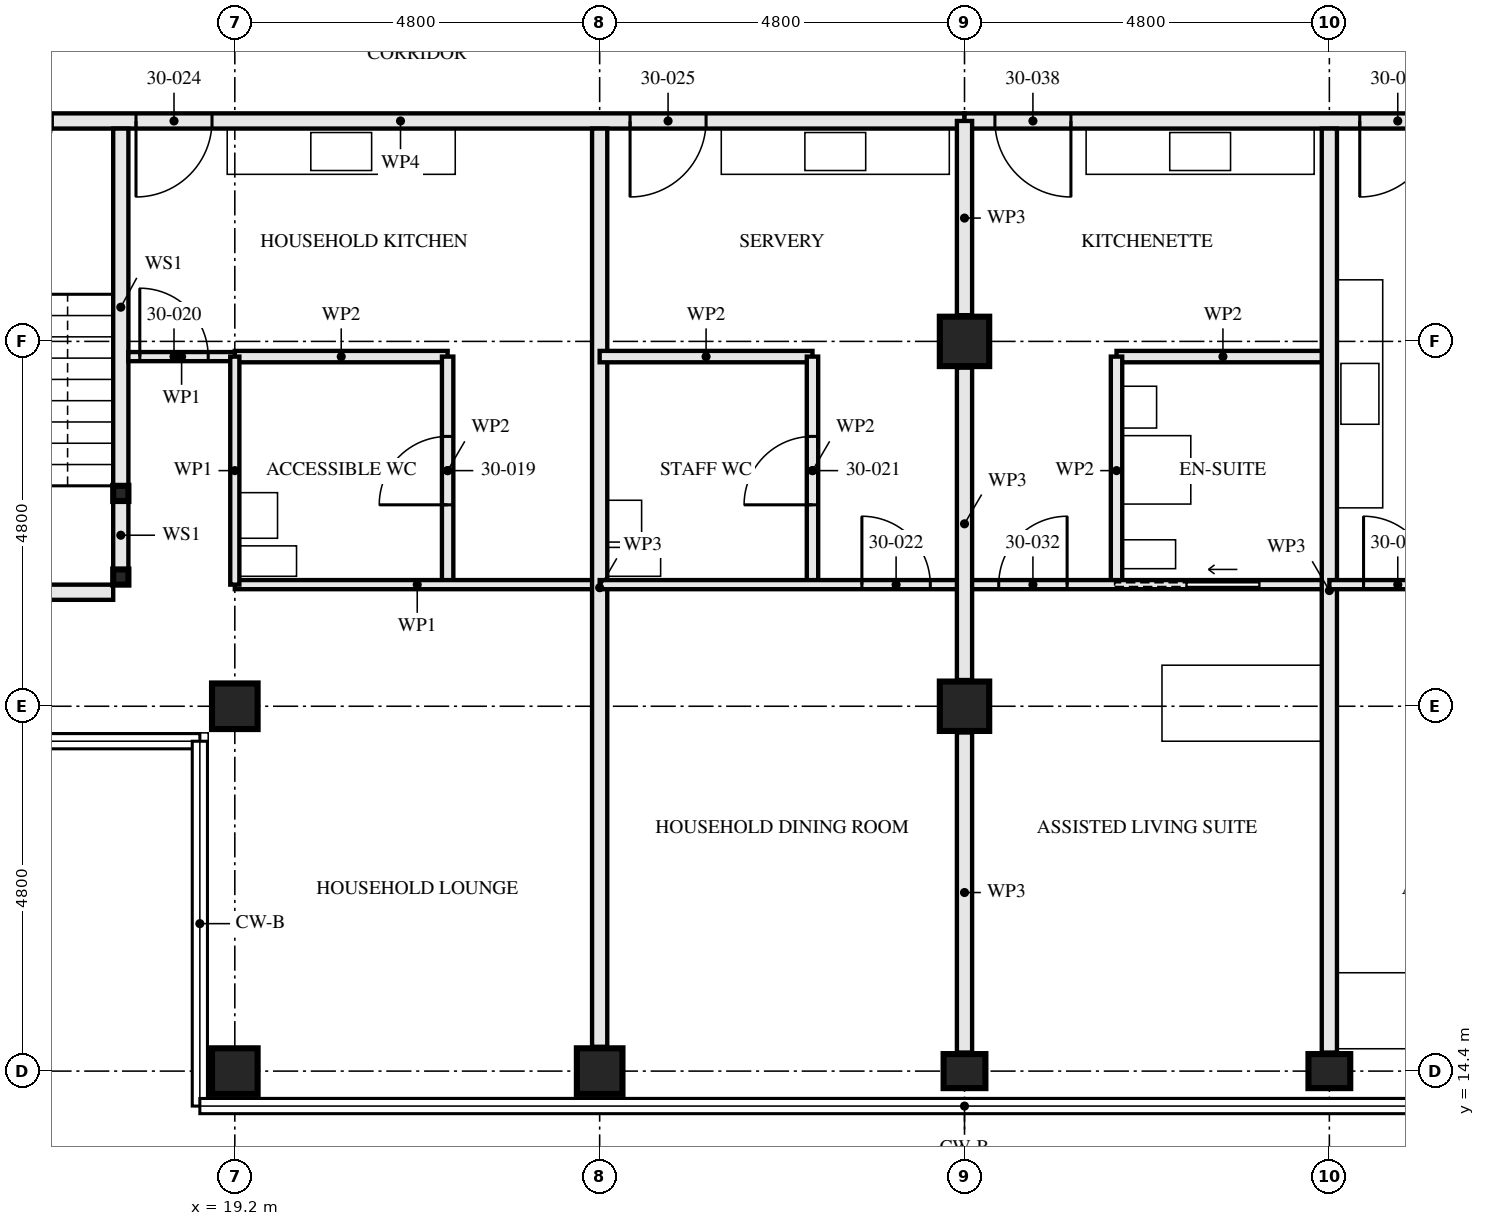
"""IFC4 building model, lengths in metres.
Left out: names, types, materials, properties, quantities, classifications, styles, units other than length and angle.
Written with IfcOpenShell. Run it as: python <this file> out.ifc"""

import sys

from ifc_helpers import new_model, si_unit, direction, frame, frame_2d, origin, origin_2d, place, context, subcontext, project, spatial, rectangle, hollow_rectangle, i_section, extrude, element, fill, save


model = new_model("IFC4")
c1 = context("Model", 3, precision=1e-05, world=origin(), true_north=direction((0.0, 1.0)))
c2 = subcontext(c1, "Body", "Model", "MODEL_VIEW")
j1 = project(units=[si_unit("LENGTHUNIT", "METRE"), si_unit("PLANEANGLEUNIT", "RADIAN")], contexts=[c1])
p1 = place(None, origin())
s1 = spatial("IfcSite", under=j1, at=p1, CompositionType="ELEMENT")
p2 = place(p1, origin())
s2 = spatial("IfcBuilding", under=s1, at=p2, CompositionType="ELEMENT")
p3 = place(p2, frame((0.0, 0.0, 112.0)))
s3 = spatial("IfcBuildingStorey", under=s2, at=p3, CompositionType="ELEMENT", Elevation=112.0)
for number, where, z_axis, x_axis in (
    (1, (19.2, 14.4, 0.0), (0.0, 0.0, 1.0), (0.0, 1.0, 0.0)),
    (2, (19.2, 19.2, 0.0), (0.0, 0.0, 1.0), (0.0, 1.0, 0.0)),
    (3, (24.0, 14.4, 0.0), (0.0, 0.0, 1.0), (0.0, 1.0, 0.0)),
):
    element("IfcColumn", number, at=place(p3, frame(where, z_axis=z_axis, x_axis=x_axis)), inside=s3, PredefinedType="COLUMN", context=c2, shape_type="SweptSolid", body=[
        extrude(hollow_rectangle(XDim=0.6, YDim=0.6, WallThickness=0.08, at=origin_2d()), origin(), (0.0, 0.0, 1.0), 3.5),
    ])
p4 = place(p3, frame((28.8, 14.4, 0.0), z_axis=(0.0, 0.0, 1.0), x_axis=(0.0, 1.0, 0.0)))
e4 = element("IfcColumn", 4, at=p4, inside=s3, PredefinedType="COLUMN", context=c2, shape_type="SweptSolid", body=[
    extrude(i_section(OverallWidth=0.448, OverallDepth=0.55, WebThickness=0.072, FlangeThickness=0.115, FilletRadius=0.015, at=origin_2d()), origin(), (0.0, 0.0, 1.0), 3.5),
])
for number, where, z_axis, x_axis in (
    (5, (28.8, 19.2, 0.0), (0.0, 0.0, 1.0), (1.0, 0.0, 0.0)),
    (6, (28.8, 24.0, 0.0), (0.0, 0.0, 1.0), (1.0, 0.0, 0.0)),
):
    element("IfcColumn", number, at=place(p3, frame(where, z_axis=z_axis, x_axis=x_axis)), inside=s3, PredefinedType="COLUMN", context=c2, shape_type="SweptSolid", body=[
        extrude(hollow_rectangle(XDim=0.65, YDim=0.65, WallThickness=0.05, at=origin_2d()), origin(), (0.0, 0.0, 1.0), 3.5),
    ])
p5 = place(p3, frame((33.6, 14.4, 0.0), z_axis=(0.0, 0.0, 1.0), x_axis=(0.0, 1.0, 0.0)))
e7 = element("IfcColumn", 7, at=p5, inside=s3, PredefinedType="COLUMN", context=c2, shape_type="SweptSolid", body=[
    extrude(i_section(OverallWidth=0.448, OverallDepth=0.55, WebThickness=0.072, FlangeThickness=0.115, FilletRadius=0.015, at=origin_2d()), origin(), (0.0, 0.0, 1.0), 3.5),
])
for number, where, z_axis, x_axis in (
    (8, (17.7, 20.9, 0.0), (0.0, 0.0, 1.0), (1.0, 0.0, 0.0)),
    (9, (17.7, 22.0, 0.0), (0.0, 0.0, 1.0), (1.0, 0.0, 0.0)),
):
    element("IfcColumn", number, at=place(p3, frame(where, z_axis=z_axis, x_axis=x_axis)), inside=s3, PredefinedType="COLUMN", context=c2, shape_type="SweptSolid", body=[
        extrude(hollow_rectangle(XDim=0.2, YDim=0.2, WallThickness=0.008, at=origin_2d()), origin(), (0.0, 0.0, 1.0), 3.33),
    ])
p6 = place(p3, frame((17.7, 21.0, 0.0), z_axis=(0.0, 0.0, 1.0), x_axis=(0.0, 1.0, 0.0)))
e10 = element("IfcWall", 10, at=p6, inside=s3, PredefinedType="SOLIDWALL", context=c2, shape_type="SweptSolid", body=[
    extrude(rectangle(XDim=0.9, YDim=0.2, at=frame_2d((0.45, 0.0))), origin(), (0.0, 0.0, 1.0), 2.99),
])
p7 = place(p3, frame((17.7, 22.1, 0.0), z_axis=(0.0, 0.0, 1.0), x_axis=(0.0, 1.0, 0.0)))
e11 = element("IfcWall", 11, at=p7, inside=s3, PredefinedType="SOLIDWALL", context=c2, shape_type="SweptSolid", body=[
    extrude(rectangle(XDim=4.7, YDim=0.2, at=frame_2d((2.35, 0.0))), origin(), (0.0, 0.0, 1.0), 2.99),
])
p8 = place(p3, frame((15.0, 20.7, 0.0), z_axis=(0.0, 0.0, 1.0), x_axis=(1.0, 0.0, 0.0)))
e12 = element("IfcWall", 12, at=p8, inside=s3, PredefinedType="SOLIDWALL", context=c2, shape_type="SweptSolid", body=[
    extrude(rectangle(XDim=2.6, YDim=0.2, at=frame_2d((1.3, 0.0))), origin(), (0.0, 0.0, 1.0), 3.33),
])
p9 = place(p3, frame((22.0, 20.8, 0.0), z_axis=(0.0, 0.0, 1.0), x_axis=(0.0, 1.0, 0.0)))
e13 = element("IfcWall", 13, at=p9, inside=s3, PredefinedType="PARTITIONING", context=c2, shape_type="SweptSolid", body=[
    extrude(rectangle(XDim=3.0, YDim=0.15, at=frame_2d((1.5, 0.0))), origin(), (0.0, 0.0, 1.0), 3.33),
])
p10 = place(p9, frame((1.05, 0.0, 0.0)))
e14 = element("IfcOpeningElement", 14, at=p10, cuts=e13, PredefinedType="OPENING", context=c2, shape_type="SweptSolid", body=[
    extrude(rectangle(XDim=0.9, YDim=2.1, at=frame_2d((0.45, 1.05))), frame((0.0, 0.085, 0.0), z_axis=(0.0, -1.0, 0.0), x_axis=(1.0, 0.0, 0.0)), (0.0, 0.0, 1.0), 0.171),
])
p11 = place(p3, frame((19.2, 23.8, 0.0), z_axis=(0.0, 0.0, 1.0), x_axis=(1.0, 0.0, 0.0)))
e15 = element("IfcWall", 15, at=p11, inside=s3, PredefinedType="PARTITIONING", context=c2, shape_type="SweptSolid", body=[
    extrude(rectangle(XDim=2.8, YDim=0.15, at=frame_2d((1.4, 0.0))), origin(), (0.0, 0.0, 1.0), 3.33),
])
p12 = place(p3, frame((17.8, 23.8, 0.0), z_axis=(0.0, 0.0, 1.0), x_axis=(1.0, 0.0, 0.0)))
e16 = element("IfcWall", 16, at=p12, inside=s3, PredefinedType="PARTITIONING", context=c2, shape_type="SweptSolid", body=[
    extrude(rectangle(XDim=1.4, YDim=0.12, at=frame_2d((0.7, 0.0))), origin(), (0.0, 0.0, 1.0), 3.33),
])
p13 = place(p12, frame((0.15, 0.0, 0.0)))
e17 = element("IfcOpeningElement", 17, at=p13, cuts=e16, PredefinedType="OPENING", context=c2, shape_type="SweptSolid", body=[
    extrude(rectangle(XDim=0.9, YDim=2.1, at=frame_2d((0.45, 1.05))), frame((0.0, 0.071, 0.0), z_axis=(0.0, -1.0, 0.0), x_axis=(1.0, 0.0, 0.0)), (0.0, 0.0, 1.0), 0.141),
])
p14 = place(p3, frame((19.2, 20.8, 0.0), z_axis=(0.0, 0.0, 1.0), x_axis=(1.0, 0.0, 0.0)))
e18 = element("IfcWall", 18, at=p14, inside=s3, PredefinedType="PARTITIONING", context=c2, shape_type="SweptSolid", body=[
    extrude(rectangle(XDim=4.8, YDim=0.12, at=frame_2d((2.4, 0.0))), origin(), (0.0, 0.0, 1.0), 3.33),
])
p15 = place(p3, frame((19.2, 20.8, 0.0), z_axis=(0.0, 0.0, 1.0), x_axis=(0.0, 1.0, 0.0)))
e19 = element("IfcWall", 19, at=p15, inside=s3, PredefinedType="PARTITIONING", context=c2, shape_type="SweptSolid", body=[
    extrude(rectangle(XDim=3.0, YDim=0.12, at=frame_2d((1.5, 0.0))), origin(), (0.0, 0.0, 1.0), 2.55),
])
p16 = place(p3, frame((24.0, 14.72, 0.0), z_axis=(0.0, 0.0, 1.0), x_axis=(0.0, 1.0, 0.0)))
e20 = element("IfcWall", 20, at=p16, inside=s3, PredefinedType="PARTITIONING", context=c2, shape_type="SweptSolid", body=[
    extrude(rectangle(XDim=12.08, YDim=0.2, at=frame_2d((6.04, 0.0))), origin(), (0.0, 0.0, 1.0), 2.55),
])
p17 = place(p3, frame((26.8, 20.8, 0.0), z_axis=(0.0, 0.0, 1.0), x_axis=(0.0, 1.0, 0.0)))
e21 = element("IfcWall", 21, at=p17, inside=s3, PredefinedType="PARTITIONING", context=c2, shape_type="SweptSolid", body=[
    extrude(rectangle(XDim=3.0, YDim=0.15, at=frame_2d((1.5, 0.0))), origin(), (0.0, 0.0, 1.0), 3.33),
])
p18 = place(p17, frame((1.05, 0.0, 0.0)))
e22 = element("IfcOpeningElement", 22, at=p18, cuts=e21, PredefinedType="OPENING", context=c2, shape_type="SweptSolid", body=[
    extrude(rectangle(XDim=0.9, YDim=2.1, at=frame_2d((0.45, 1.05))), frame((0.0, 0.085, 0.0), z_axis=(0.0, -1.0, 0.0), x_axis=(1.0, 0.0, 0.0)), (0.0, 0.0, 1.0), 0.171),
])
p19 = place(p3, frame((24.0, 23.8, 0.0), z_axis=(0.0, 0.0, 1.0), x_axis=(1.0, 0.0, 0.0)))
e23 = element("IfcWall", 23, at=p19, inside=s3, PredefinedType="PARTITIONING", context=c2, shape_type="SweptSolid", body=[
    extrude(rectangle(XDim=2.8, YDim=0.15, at=frame_2d((1.4, 0.0))), origin(), (0.0, 0.0, 1.0), 3.33),
])
p20 = place(p3, frame((24.0, 20.8, 0.0), z_axis=(0.0, 0.0, 1.0), x_axis=(1.0, 0.0, 0.0)))
e24 = element("IfcWall", 24, at=p20, inside=s3, PredefinedType="PARTITIONING", context=c2, shape_type="SweptSolid", body=[
    extrude(rectangle(XDim=4.8, YDim=0.12, at=frame_2d((2.4, 0.0))), origin(), (0.0, 0.0, 1.0), 3.33),
])
p21 = place(p20, frame((3.45, 0.0, 0.0)))
e25 = element("IfcOpeningElement", 25, at=p21, cuts=e24, PredefinedType="OPENING", context=c2, shape_type="SweptSolid", body=[
    extrude(rectangle(XDim=0.9, YDim=2.1, at=frame_2d((0.45, 1.05))), frame((0.0, 0.071, 0.0), z_axis=(0.0, -1.0, 0.0), x_axis=(1.0, 0.0, 0.0)), (0.0, 0.0, 1.0), 0.141),
])
p22 = place(p3, frame((13.96, 26.9, 0.0), z_axis=(0.0, 0.0, 1.0), x_axis=(1.0, 0.0, 0.0)))
e26 = element("IfcWall", 26, at=p22, inside=s3, PredefinedType="PARTITIONING", context=c2, shape_type="SweptSolid", body=[
    extrude(rectangle(XDim=14.84, YDim=0.2, at=frame_2d((7.42, 0.0))), origin(), (0.0, 0.0, 1.0), 2.32),
])
p23 = place(p22, frame((1.84, 0.0, 0.0)))
e27 = element("IfcOpeningElement", 27, at=p23, cuts=e26, PredefinedType="OPENING", context=c2, shape_type="SweptSolid", body=[
    extrude(rectangle(XDim=1.0, YDim=2.1, at=frame_2d((0.5, 1.05))), frame((0.0, 0.111, 0.0), z_axis=(0.0, -1.0, 0.0), x_axis=(1.0, 0.0, 0.0)), (0.0, 0.0, 1.0), 0.221),
])
p24 = place(p22, frame((3.94, 0.0, 0.0)))
e28 = element("IfcOpeningElement", 28, at=p24, cuts=e26, PredefinedType="OPENING", context=c2, shape_type="SweptSolid", body=[
    extrude(rectangle(XDim=1.0, YDim=2.1, at=frame_2d((0.5, 1.05))), frame((0.0, 0.111, 0.0), z_axis=(0.0, -1.0, 0.0), x_axis=(1.0, 0.0, 0.0)), (0.0, 0.0, 1.0), 0.221),
])
p25 = place(p22, frame((10.44, 0.0, 0.0)))
e29 = element("IfcOpeningElement", 29, at=p25, cuts=e26, PredefinedType="OPENING", context=c2, shape_type="SweptSolid", body=[
    extrude(rectangle(XDim=1.0, YDim=2.1, at=frame_2d((0.5, 1.05))), frame((0.0, 0.111, 0.0), z_axis=(0.0, -1.0, 0.0), x_axis=(1.0, 0.0, 0.0)), (0.0, 0.0, 1.0), 0.221),
])
p26 = place(p3, frame((30.8, 20.8, 0.0), z_axis=(0.0, 0.0, 1.0), x_axis=(0.0, 1.0, 0.0)))
e30 = element("IfcWall", 30, at=p26, inside=s3, PredefinedType="PARTITIONING", context=c2, shape_type="SweptSolid", body=[
    extrude(rectangle(XDim=3.0, YDim=0.15, at=frame_2d((1.5, 0.0))), origin(), (0.0, 0.0, 1.0), 3.33),
])
p27 = place(p3, frame((30.8, 23.8, 0.0), z_axis=(0.0, 0.0, 1.0), x_axis=(1.0, 0.0, 0.0)))
e31 = element("IfcWall", 31, at=p27, inside=s3, PredefinedType="PARTITIONING", context=c2, shape_type="SweptSolid", body=[
    extrude(rectangle(XDim=2.8, YDim=0.15, at=frame_2d((1.4, 0.0))), origin(), (0.0, 0.0, 1.0), 3.33),
])
p28 = place(p3, frame((28.8, 20.8, 0.0), z_axis=(0.0, 0.0, 1.0), x_axis=(1.0, 0.0, 0.0)))
e32 = element("IfcWall", 32, at=p28, inside=s3, PredefinedType="PARTITIONING", context=c2, shape_type="SweptSolid", body=[
    extrude(rectangle(XDim=4.8, YDim=0.12, at=frame_2d((2.4, 0.0))), origin(), (0.0, 0.0, 1.0), 3.33),
])
p29 = place(p28, frame((0.45, 0.0, 0.0)))
e33 = element("IfcOpeningElement", 33, at=p29, cuts=e32, PredefinedType="OPENING", context=c2, shape_type="SweptSolid", body=[
    extrude(rectangle(XDim=0.9, YDim=2.1, at=frame_2d((0.45, 1.05))), frame((0.0, 0.071, 0.0), z_axis=(0.0, -1.0, 0.0), x_axis=(1.0, 0.0, 0.0)), (0.0, 0.0, 1.0), 0.141),
])
p30 = place(p28, frame((2.925, 0.0, 0.0)))
e34 = element("IfcOpeningElement", 34, at=p30, cuts=e32, PredefinedType="OPENING", context=c2, shape_type="SweptSolid", body=[
    extrude(rectangle(XDim=0.95, YDim=2.1, at=frame_2d((0.475, 1.05))), frame((0.0, 0.071, 0.0), z_axis=(0.0, -1.0, 0.0), x_axis=(1.0, 0.0, 0.0)), (0.0, 0.0, 1.0), 0.141),
])
p31 = place(p3, frame((33.6, 14.644, 0.0), z_axis=(0.0, 0.0, 1.0), x_axis=(0.0, 1.0, 0.0)))
e35 = element("IfcWall", 35, at=p31, inside=s3, PredefinedType="PARTITIONING", context=c2, shape_type="SweptSolid", body=[
    extrude(rectangle(XDim=12.156, YDim=0.2, at=frame_2d((6.078, 0.0))), origin(), (0.0, 0.0, 1.0), 2.55),
])
p32 = place(p3, frame((33.6, 20.8, 0.0), z_axis=(0.0, 0.0, 1.0), x_axis=(1.0, 0.0, 0.0)))
e36 = element("IfcWall", 36, at=p32, inside=s3, PredefinedType="PARTITIONING", context=c2, shape_type="SweptSolid", body=[
    extrude(rectangle(XDim=4.8, YDim=0.12, at=frame_2d((2.4, 0.0))), origin(), (0.0, 0.0, 1.0), 3.33),
])
p33 = place(p32, frame((0.45, 0.0, 0.0)))
e37 = element("IfcOpeningElement", 37, at=p33, cuts=e36, PredefinedType="OPENING", context=c2, shape_type="SweptSolid", body=[
    extrude(rectangle(XDim=0.9, YDim=2.1, at=frame_2d((0.45, 1.05))), frame((0.0, 0.071, 0.0), z_axis=(0.0, -1.0, 0.0), x_axis=(1.0, 0.0, 0.0)), (0.0, 0.0, 1.0), 0.141),
])
p34 = place(p32, frame((2.925, 0.0, 0.0)))
e38 = element("IfcOpeningElement", 38, at=p34, cuts=e36, PredefinedType="OPENING", context=c2, shape_type="SweptSolid", body=[
    extrude(rectangle(XDim=0.95, YDim=2.1, at=frame_2d((0.475, 1.05))), frame((0.0, 0.071, 0.0), z_axis=(0.0, -1.0, 0.0), x_axis=(1.0, 0.0, 0.0)), (0.0, 0.0, 1.0), 0.141),
])
p35 = place(p3, frame((28.8, 26.9, 0.0), z_axis=(0.0, 0.0, 1.0), x_axis=(1.0, 0.0, 0.0)))
e39 = element("IfcWall", 39, at=p35, inside=s3, PredefinedType="PARTITIONING", context=c2, shape_type="SweptSolid", body=[
    extrude(rectangle(XDim=9.6, YDim=0.2, at=frame_2d((4.8, 0.0))), origin(), (0.0, 0.0, 1.0), 3.33),
])
p36 = place(p35, frame((0.4, 0.0, 0.0)))
e40 = element("IfcOpeningElement", 40, at=p36, cuts=e39, PredefinedType="OPENING", context=c2, shape_type="SweptSolid", body=[
    extrude(rectangle(XDim=1.0, YDim=2.1, at=frame_2d((0.5, 1.05))), frame((0.0, 0.111, 0.0), z_axis=(0.0, -1.0, 0.0), x_axis=(1.0, 0.0, 0.0)), (0.0, 0.0, 1.0), 0.221),
])
p37 = place(p35, frame((5.2, 0.0, 0.0)))
e41 = element("IfcOpeningElement", 41, at=p37, cuts=e39, PredefinedType="OPENING", context=c2, shape_type="SweptSolid", body=[
    extrude(rectangle(XDim=1.0, YDim=2.1, at=frame_2d((0.5, 1.05))), frame((0.0, 0.111, 0.0), z_axis=(0.0, -1.0, 0.0), x_axis=(1.0, 0.0, 0.0)), (0.0, 0.0, 1.0), 0.221),
])
p38 = place(p3, frame((28.8, 14.644, 0.0), z_axis=(0.0, 0.0, 1.0), x_axis=(0.0, 1.0, 0.0)))
e42 = element("IfcWall", 42, at=p38, inside=s3, PredefinedType="PARTITIONING", context=c2, shape_type="SweptSolid", body=[
    extrude(rectangle(XDim=4.211, YDim=0.2, at=frame_2d((2.105, 0.0))), origin(), (0.0, 0.0, 1.0), 2.32),
])
p39 = place(p3, frame((28.8, 19.545, 0.0), z_axis=(0.0, 0.0, 1.0), x_axis=(0.0, 1.0, 0.0)))
e43 = element("IfcWall", 43, at=p39, inside=s3, PredefinedType="PARTITIONING", context=c2, shape_type="SweptSolid", body=[
    extrude(rectangle(XDim=4.11, YDim=0.2, at=frame_2d((2.055, 0.0))), origin(), (0.0, 0.0, 1.0), 2.32),
])
p40 = place(p3, frame((28.8, 24.345, 0.0), z_axis=(0.0, 0.0, 1.0), x_axis=(0.0, 1.0, 0.0)))
e44 = element("IfcWall", 44, at=p40, inside=s3, PredefinedType="PARTITIONING", context=c2, shape_type="SweptSolid", body=[
    extrude(rectangle(XDim=2.555, YDim=0.2, at=frame_2d((1.277, 0.0))), origin(), (0.0, 0.0, 1.0), 2.32),
])
p41 = place(p10, origin())
e45 = element("IfcDoor", 45, at=p41, inside=s3, OperationType="SINGLE_SWING_RIGHT", PredefinedType="DOOR", context=c2, shape_type="SweptSolid", body=[
    extrude(rectangle(XDim=0.9, YDim=2.1, at=frame_2d((0.45, 1.05))), frame((0.0, 0.022, 0.0), z_axis=(0.0, -1.0, 0.0), x_axis=(1.0, 0.0, 0.0)), (0.0, 0.0, 1.0), 0.044),
])
fill(e14, e45)
p42 = place(p13, origin())
e46 = element("IfcDoor", 46, at=p42, inside=s3, OperationType="SINGLE_SWING_RIGHT", PredefinedType="DOOR", context=c2, shape_type="SweptSolid", body=[
    extrude(rectangle(XDim=0.9, YDim=2.1, at=frame_2d((0.45, 1.05))), frame((0.0, 0.022, 0.0), z_axis=(0.0, -1.0, 0.0), x_axis=(1.0, 0.0, 0.0)), (0.0, 0.0, 1.0), 0.044),
])
fill(e17, e46)
p43 = place(p18, origin())
e47 = element("IfcDoor", 47, at=p43, inside=s3, OperationType="SINGLE_SWING_RIGHT", PredefinedType="DOOR", context=c2, shape_type="SweptSolid", body=[
    extrude(rectangle(XDim=0.9, YDim=2.1, at=frame_2d((0.45, 1.05))), frame((0.0, 0.022, 0.0), z_axis=(0.0, -1.0, 0.0), x_axis=(1.0, 0.0, 0.0)), (0.0, 0.0, 1.0), 0.044),
])
fill(e22, e47)
p44 = place(p21, origin())
e48 = element("IfcDoor", 48, at=p44, inside=s3, OperationType="SINGLE_SWING_RIGHT", PredefinedType="DOOR", context=c2, shape_type="SweptSolid", body=[
    extrude(rectangle(XDim=0.9, YDim=2.1, at=frame_2d((0.45, 1.05))), frame((0.0, 0.022, 0.0), z_axis=(0.0, -1.0, 0.0), x_axis=(1.0, 0.0, 0.0)), (0.0, 0.0, 1.0), 0.044),
])
fill(e25, e48)
p45 = place(p24, frame((1.0, 0.0, 0.0), z_axis=(0.0, 0.0, 1.0), x_axis=(-1.0, 0.0, 0.0)))
e49 = element("IfcDoor", 49, at=p45, inside=s3, OperationType="SINGLE_SWING_LEFT", PredefinedType="DOOR", context=c2, shape_type="SweptSolid", body=[
    extrude(rectangle(XDim=1.0, YDim=2.1, at=frame_2d((0.5, 1.05))), frame((0.0, 0.027, 0.0), z_axis=(0.0, -1.0, 0.0), x_axis=(1.0, 0.0, 0.0)), (0.0, 0.0, 1.0), 0.054),
])
fill(e28, e49)
p46 = place(p25, frame((1.0, 0.0, 0.0), z_axis=(0.0, 0.0, 1.0), x_axis=(-1.0, 0.0, 0.0)))
e50 = element("IfcDoor", 50, at=p46, inside=s3, OperationType="SINGLE_SWING_LEFT", PredefinedType="DOOR", context=c2, shape_type="SweptSolid", body=[
    extrude(rectangle(XDim=1.0, YDim=2.1, at=frame_2d((0.5, 1.05))), frame((0.0, 0.027, 0.0), z_axis=(0.0, -1.0, 0.0), x_axis=(1.0, 0.0, 0.0)), (0.0, 0.0, 1.0), 0.054),
])
fill(e29, e50)
p47 = place(p29, origin())
e51 = element("IfcDoor", 51, at=p47, inside=s3, OperationType="SINGLE_SWING_LEFT", PredefinedType="DOOR", context=c2, shape_type="SweptSolid", body=[
    extrude(rectangle(XDim=0.9, YDim=2.1, at=frame_2d((0.45, 1.05))), frame((0.0, 0.022, 0.0), z_axis=(0.0, -1.0, 0.0), x_axis=(1.0, 0.0, 0.0)), (0.0, 0.0, 1.0), 0.044),
])
fill(e33, e51)
p48 = place(p30, origin())
e52 = element("IfcDoor", 52, at=p48, inside=s3, OperationType="SLIDING_TO_RIGHT", PredefinedType="DOOR", context=c2, shape_type="SweptSolid", body=[
    extrude(rectangle(XDim=0.95, YDim=2.1, at=frame_2d((0.475, 1.05))), frame((0.0, 0.022, 0.0), z_axis=(0.0, -1.0, 0.0), x_axis=(1.0, 0.0, 0.0)), (0.0, 0.0, 1.0), 0.044),
])
fill(e34, e52)
p49 = place(p33, origin())
e53 = element("IfcDoor", 53, at=p49, inside=s3, OperationType="SINGLE_SWING_RIGHT", PredefinedType="DOOR", context=c2, shape_type="SweptSolid", body=[
    extrude(rectangle(XDim=0.9, YDim=2.1, at=frame_2d((0.45, 1.05))), frame((0.0, 0.022, 0.0), z_axis=(0.0, -1.0, 0.0), x_axis=(1.0, 0.0, 0.0)), (0.0, 0.0, 1.0), 0.044),
])
fill(e37, e53)
p50 = place(p36, frame((1.0, 0.0, 0.0), z_axis=(0.0, 0.0, 1.0), x_axis=(-1.0, 0.0, 0.0)))
e54 = element("IfcDoor", 54, at=p50, inside=s3, OperationType="SINGLE_SWING_RIGHT", PredefinedType="DOOR", context=c2, shape_type="SweptSolid", body=[
    extrude(rectangle(XDim=1.0, YDim=2.1, at=frame_2d((0.5, 1.05))), frame((0.0, 0.027, 0.0), z_axis=(0.0, -1.0, 0.0), x_axis=(1.0, 0.0, 0.0)), (0.0, 0.0, 1.0), 0.054),
])
fill(e40, e54)
p51 = place(p37, frame((1.0, 0.0, 0.0), z_axis=(0.0, 0.0, 1.0), x_axis=(-1.0, 0.0, 0.0)))
e55 = element("IfcDoor", 55, at=p51, inside=s3, OperationType="SINGLE_SWING_LEFT", PredefinedType="DOOR", context=c2, shape_type="SweptSolid", body=[
    extrude(rectangle(XDim=1.0, YDim=2.1, at=frame_2d((0.5, 1.05))), frame((0.0, 0.027, 0.0), z_axis=(0.0, -1.0, 0.0), x_axis=(1.0, 0.0, 0.0)), (0.0, 0.0, 1.0), 0.054),
])
fill(e41, e55)
save(model, sys.argv[1])
